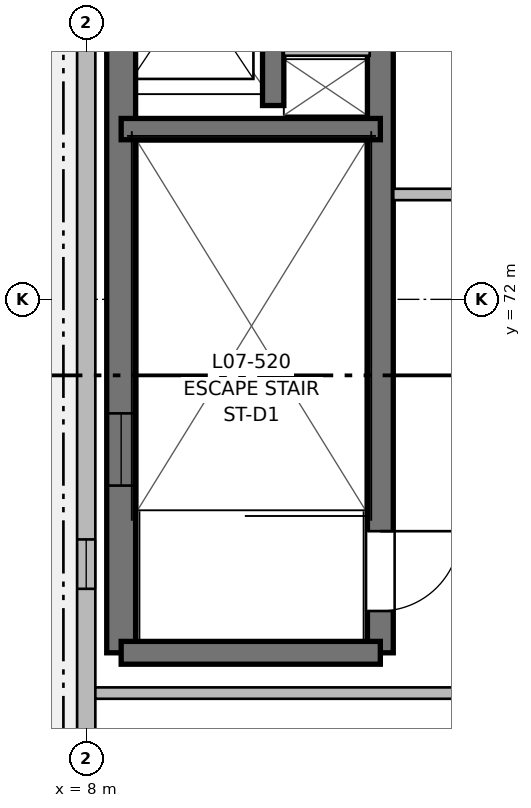
"""IFC4 building model, lengths in metres.
Left out: names, types, materials, properties, quantities, classifications, styles, units other than length and angle.
Written with IfcOpenShell. Run it as: python <this file> out.ifc"""

import sys

from ifc_helpers import new_model, si_unit, direction, frame, frame_2d, origin, place, context, subcontext, project, spatial, rectangle, extrude, element, fill, save


model = new_model("IFC4")
c1 = context("Model", 3, precision=1e-05, world=origin(), true_north=direction((0.0, 1.0)))
c2 = subcontext(c1, "Body", "Model", "MODEL_VIEW")
j1 = project(units=[si_unit("LENGTHUNIT", "METRE"), si_unit("PLANEANGLEUNIT", "RADIAN")], contexts=[c1])
p1 = place(None, origin())
s1 = spatial("IfcSite", under=j1, at=p1, CompositionType="ELEMENT")
p2 = place(p1, origin())
s2 = spatial("IfcBuilding", under=s1, at=p2, CompositionType="ELEMENT")
p3 = place(p2, frame((0.0, 0.0, 23.36)))
s3 = spatial("IfcBuildingStorey", under=s2, at=p3, CompositionType="ELEMENT", Elevation=23.36)
p4 = place(p3, frame((8.46, 67.35, 0.0), z_axis=(0.0, 0.0, 1.0), x_axis=(0.0, 1.0, 0.0)))
e1 = element("IfcWall", 1, at=p4, inside=s3, PredefinedType="SHEAR", context=c2, shape_type="SweptSolid", body=[
    extrude(rectangle(XDim=12.45, YDim=0.38, at=frame_2d((6.225, 0.0))), origin(), (0.0, 0.0, 1.0), 3.2),
])
p5 = place(p4, frame((2.2, 0.0, 0.97)))
e2 = element("IfcOpeningElement", 2, at=p5, cuts=e1, PredefinedType="OPENING", context=c2, shape_type="SweptSolid", body=[
    extrude(rectangle(XDim=0.95, YDim=1.25, at=frame_2d((0.475, 0.625))), frame((0.0, 0.2, 0.0), z_axis=(0.0, -1.0, 0.0), x_axis=(1.0, 0.0, 0.0)), (0.0, 0.0, 1.0), 0.4),
])
p6 = place(p3, frame((11.87, 79.8, 0.0), z_axis=(0.0, 0.0, 1.0), x_axis=(0.0, -1.0, 0.0)))
e3 = element("IfcWall", 3, at=p6, inside=s3, PredefinedType="SHEAR", context=c2, shape_type="SweptSolid", body=[
    extrude(rectangle(XDim=12.45, YDim=0.34, at=frame_2d((6.225, 0.0))), origin(), (0.0, 0.0, 1.0), 3.2),
])
p7 = place(p6, frame((10.85, 0.0, 0.0)))
e4 = element("IfcOpeningElement", 4, at=p7, cuts=e3, PredefinedType="OPENING", context=c2, shape_type="SweptSolid", body=[
    extrude(rectangle(XDim=1.05, YDim=2.15, at=frame_2d((0.525, 1.075))), frame((0.0, 0.18, 0.0), z_axis=(0.0, -1.0, 0.0), x_axis=(1.0, 0.0, 0.0)), (0.0, 0.0, 1.0), 0.36),
])
p8 = place(p3, frame((11.87, 67.35, 0.0), z_axis=(0.0, 0.0, 1.0), x_axis=(-1.0, 0.0, 0.0)))
e5 = element("IfcWall", 5, at=p8, inside=s3, PredefinedType="SHEAR", context=c2, shape_type="SweptSolid", body=[
    extrude(rectangle(XDim=3.41, YDim=0.3, at=frame_2d((1.705, 0.0))), origin(), (0.0, 0.0, 1.0), 3.2),
])
p9 = place(p3, frame((8.46, 74.24, 0.0), z_axis=(0.0, 0.0, 1.0), x_axis=(1.0, 0.0, 0.0)))
e6 = element("IfcWall", 6, at=p9, inside=s3, PredefinedType="SHEAR", context=c2, shape_type="SweptSolid", body=[
    extrude(rectangle(XDim=3.41, YDim=0.28, at=frame_2d((1.705, 0.0))), origin(), (0.0, 0.0, 1.0), 3.2),
])
p10 = place(p3, frame((10.46, 74.55, 0.0), z_axis=(0.0, 0.0, 1.0), x_axis=(0.0, 1.0, 0.0)))
e7 = element("IfcWall", 7, at=p10, inside=s3, PredefinedType="SHEAR", context=c2, shape_type="SweptSolid", body=[
    extrude(rectangle(XDim=5.25, YDim=0.28, at=frame_2d((2.625, 0.0))), origin(), (0.0, 0.0, 1.0), 3.2),
])
p11 = place(p10, frame((1.15, 0.0, 0.0)))
e8 = element("IfcOpeningElement", 8, at=p11, cuts=e7, PredefinedType="OPENING", context=c2, shape_type="SweptSolid", body=[
    extrude(rectangle(XDim=1.0, YDim=2.15, at=frame_2d((0.5, 1.075))), frame((0.0, 0.15, 0.0), z_axis=(0.0, -1.0, 0.0), x_axis=(1.0, 0.0, 0.0)), (0.0, 0.0, 1.0), 0.3),
])
p12 = place(p10, frame((3.85, 0.0, 0.0)))
e9 = element("IfcOpeningElement", 9, at=p12, cuts=e7, PredefinedType="OPENING", context=c2, shape_type="SweptSolid", body=[
    extrude(rectangle(XDim=0.9, YDim=2.15, at=frame_2d((0.45, 1.075))), frame((0.0, 0.15, 0.0), z_axis=(0.0, -1.0, 0.0), x_axis=(1.0, 0.0, 0.0)), (0.0, 0.0, 1.0), 0.3),
])
p13 = place(p3, frame((10.6, 75.28, 0.0), z_axis=(0.0, 0.0, 1.0), x_axis=(1.0, 0.0, 0.0)))
e10 = element("IfcWall", 10, at=p13, inside=s3, PredefinedType="PARTITIONING", context=c2, shape_type="SweptSolid", body=[
    extrude(rectangle(XDim=1.13, YDim=0.15, at=frame_2d((0.565, 0.0))), origin(), (0.0, 0.0, 1.0), 2.95),
])
p14 = place(p3, frame((8.0, 64.4, 0.0), z_axis=(0.0, 0.0, 1.0), x_axis=(0.0, 1.0, 0.0)))
e11 = element("IfcWall", 11, at=p14, inside=s3, PredefinedType="SOLIDWALL", context=c2, shape_type="SweptSolid", body=[
    extrude(rectangle(XDim=49.4, YDim=0.24, at=frame_2d((24.7, 0.0))), origin(), (0.0, 0.0, 1.0), 2.98),
])
p15 = place(p14, frame((3.792, 0.0, 0.9)))
e12 = element("IfcOpeningElement", 12, at=p15, cuts=e11, PredefinedType="OPENING", context=c2, shape_type="SweptSolid", body=[
    extrude(rectangle(XDim=0.65, YDim=0.95, at=frame_2d((0.325, 0.475))), frame((0.0, 0.13, 0.0), z_axis=(0.0, -1.0, 0.0), x_axis=(1.0, 0.0, 0.0)), (0.0, 0.0, 1.0), 0.26),
])
p16 = place(p14, frame((11.8, 0.0, 0.62)))
e13 = element("IfcOpeningElement", 13, at=p16, cuts=e11, PredefinedType="OPENING", context=c2, shape_type="SweptSolid", body=[
    extrude(rectangle(XDim=1.1, YDim=1.6, at=frame_2d((0.55, 0.8))), frame((0.0, 0.13, 0.0), z_axis=(0.0, -1.0, 0.0), x_axis=(1.0, 0.0, 0.0)), (0.0, 0.0, 1.0), 0.26),
])
p17 = place(p14, frame((18.683, 0.0, 0.0)))
e14 = element("IfcOpeningElement", 14, at=p17, cuts=e11, PredefinedType="OPENING", context=c2, shape_type="SweptSolid", body=[
    extrude(rectangle(XDim=1.2, YDim=2.2, at=frame_2d((0.6, 1.1))), frame((0.0, 0.13, 0.0), z_axis=(0.0, -1.0, 0.0), x_axis=(1.0, 0.0, 0.0)), (0.0, 0.0, 1.0), 0.26),
])
p18 = place(p14, frame((21.883, 0.0, 0.72)))
e15 = element("IfcOpeningElement", 15, at=p18, cuts=e11, PredefinedType="OPENING", context=c2, shape_type="SweptSolid", body=[
    extrude(rectangle(XDim=1.8, YDim=1.5, at=frame_2d((0.9, 0.75))), frame((0.0, 0.13, 0.0), z_axis=(0.0, -1.0, 0.0), x_axis=(1.0, 0.0, 0.0)), (0.0, 0.0, 1.0), 0.26),
])
p19 = place(p14, frame((29.267, 0.0, 0.72)))
e16 = element("IfcOpeningElement", 16, at=p19, cuts=e11, PredefinedType="OPENING", context=c2, shape_type="SweptSolid", body=[
    extrude(rectangle(XDim=1.7, YDim=1.5, at=frame_2d((0.85, 0.75))), frame((0.0, 0.13, 0.0), z_axis=(0.0, -1.0, 0.0), x_axis=(1.0, 0.0, 0.0)), (0.0, 0.0, 1.0), 0.26),
])
p20 = place(p14, frame((32.9, 0.0, 0.57)))
e17 = element("IfcOpeningElement", 17, at=p20, cuts=e11, PredefinedType="OPENING", context=c2, shape_type="SweptSolid", body=[
    extrude(rectangle(XDim=2.3, YDim=1.65, at=frame_2d((1.15, 0.825))), frame((0.0, 0.13, 0.0), z_axis=(0.0, -1.0, 0.0), x_axis=(1.0, 0.0, 0.0)), (0.0, 0.0, 1.0), 0.26),
])
p21 = place(p14, frame((42.758, 0.0, 0.77)))
e18 = element("IfcOpeningElement", 18, at=p21, cuts=e11, PredefinedType="OPENING", context=c2, shape_type="SweptSolid", body=[
    extrude(rectangle(XDim=1.45, YDim=1.45, at=frame_2d((0.725, 0.725))), frame((0.0, 0.13, 0.0), z_axis=(0.0, -1.0, 0.0), x_axis=(1.0, 0.0, 0.0)), (0.0, 0.0, 1.0), 0.26),
])
p22 = place(p3, frame((8.12, 66.82, 0.0), z_axis=(0.0, 0.0, 1.0), x_axis=(1.0, 0.0, 0.0)))
e19 = element("IfcWall", 19, at=p22, inside=s3, PredefinedType="PARTITIONING", context=c2, shape_type="SweptSolid", body=[
    extrude(rectangle(XDim=6.6, YDim=0.15, at=frame_2d((3.3, 0.0))), origin(), (0.0, 0.0, 1.0), 2.935),
])
p23 = place(p3, frame((12.04, 73.38, 0.0), z_axis=(0.0, 0.0, 1.0), x_axis=(1.0, 0.0, 0.0)))
e20 = element("IfcWall", 20, at=p23, inside=s3, PredefinedType="PARTITIONING", context=c2, shape_type="SweptSolid", body=[
    extrude(rectangle(XDim=2.68, YDim=0.15, at=frame_2d((1.34, 0.0))), origin(), (0.0, 0.0, 1.0), 2.935),
])
p24 = place(p7, origin())
e21 = element("IfcDoor", 21, at=p24, inside=s3, OperationType="SINGLE_SWING_LEFT", PredefinedType="DOOR", context=c2, shape_type="SweptSolid", body=[
    extrude(rectangle(XDim=1.05, YDim=2.15, at=frame_2d((0.525, 1.075))), frame((0.0, 0.025, 0.0), z_axis=(0.0, -1.0, 0.0), x_axis=(1.0, 0.0, 0.0)), (0.0, 0.0, 1.0), 0.05),
])
fill(e4, e21)
p25 = place(p5, origin())
e22 = element("IfcWindow", 22, at=p25, inside=s3, PartitioningType="SINGLE_PANEL", PredefinedType="WINDOW", context=c2, shape_type="SweptSolid", body=[
    extrude(rectangle(XDim=0.95, YDim=1.25, at=frame_2d((0.475, 0.625))), frame((0.0, 0.03, 0.0), z_axis=(0.0, -1.0, 0.0), x_axis=(1.0, 0.0, 0.0)), (0.0, 0.0, 1.0), 0.06),
])
fill(e2, e22)
p26 = place(p15, origin())
e23 = element("IfcWindow", 23, at=p26, inside=s3, PartitioningType="SINGLE_PANEL", PredefinedType="WINDOW", context=c2, shape_type="SweptSolid", body=[
    extrude(rectangle(XDim=0.65, YDim=0.95, at=frame_2d((0.325, 0.475))), frame((0.0, 0.03, 0.0), z_axis=(0.0, -1.0, 0.0), x_axis=(1.0, 0.0, 0.0)), (0.0, 0.0, 1.0), 0.06),
])
fill(e12, e23)
save(model, sys.argv[1])
